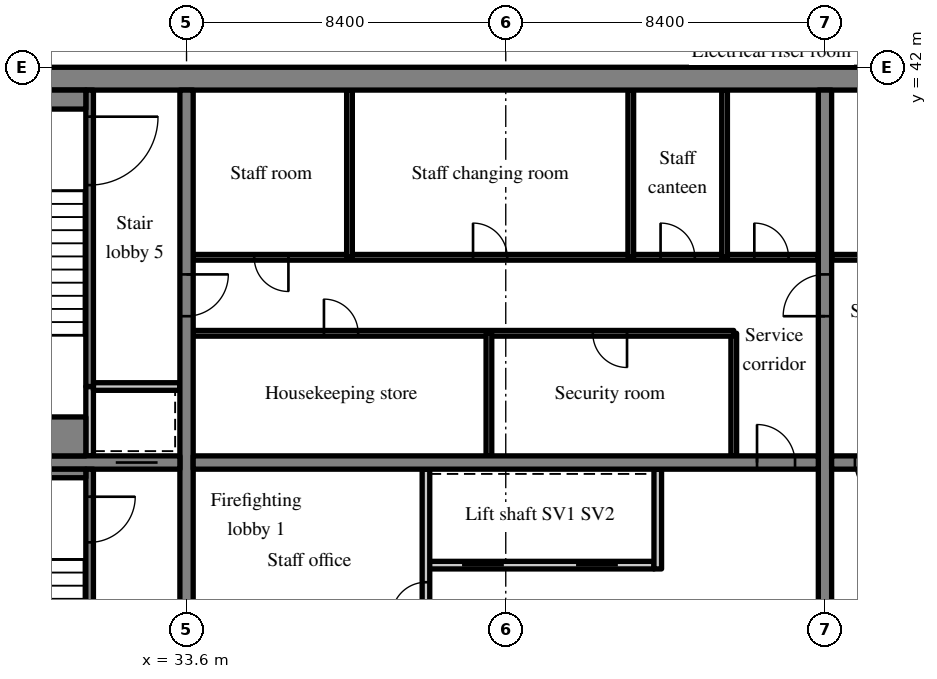
"""IFC4 building model, lengths in metres.
Left out: names, types, materials, properties, quantities, classifications, styles, units other than length and angle.
Written with IfcOpenShell. Run it as: python <this file> out.ifc"""

import sys

from ifc_helpers import new_model, si_unit, direction, frame, frame_2d, origin, place, context, subcontext, project, spatial, rectangle, extrude, source, transform, mapped, element, fill, save


model = new_model("IFC4")
c1 = context("Model", 3, precision=1e-05, world=origin(), true_north=direction((0.0, 1.0)))
c2 = subcontext(c1, "Body", "Model", "MODEL_VIEW")
j1 = project(units=[si_unit("LENGTHUNIT", "METRE"), si_unit("PLANEANGLEUNIT", "RADIAN")], contexts=[c1])
p1 = place(None, origin())
s1 = spatial("IfcSite", under=j1, at=p1, CompositionType="ELEMENT")
p2 = place(p1, origin())
s2 = spatial("IfcBuilding", under=s1, at=p2, CompositionType="ELEMENT")
p3 = place(p2, frame((0.0, 0.0, 225.7)))
s3 = spatial("IfcBuildingStorey", under=s2, at=p3, CompositionType="ELEMENT", Elevation=225.7)
m1 = source(origin(), c2, "Body", "SweptSolid", [
    extrude(rectangle(XDim=50.4, YDim=0.6, at=frame_2d((25.2, 0.0))), origin(), (0.0, 0.0, 1.0), 3.62),
])
p4 = place(p3, frame((25.2, 41.7, 0.0), z_axis=(0.0, 0.0, 1.0), x_axis=(1.0, 0.0, 0.0)))
e1 = element("IfcWall", 1, at=p4, inside=s3, PredefinedType="SHEAR", context=c2, shape_type="MappedRepresentation", body=[
    mapped(m1, transform((0.0, 0.0, 0.0), scale=1.0)),
])
m2 = source(origin(), c2, "Body", "SweptSolid", [
    extrude(rectangle(XDim=18.8, YDim=0.35, at=frame_2d((9.4, 0.0))), origin(), (0.0, 0.0, 1.0), 3.62),
])
p5 = place(p3, frame((33.6, 22.6, 0.0), z_axis=(0.0, 0.0, 1.0), x_axis=(0.0, 1.0, 0.0)))
e2 = element("IfcWall", 2, at=p5, inside=s3, PredefinedType="SHEAR", context=c2, shape_type="MappedRepresentation", body=[
    mapped(m2, transform((0.0, 0.0, 0.0), scale=1.0)),
])
m3 = source(origin(), c2, "Body", "SweptSolid", [
    extrude(rectangle(XDim=1.1, YDim=2.1, at=frame_2d((0.55, 1.05))), frame((0.0, 0.185, 0.0), z_axis=(0.0, -1.0, 0.0), x_axis=(1.0, 0.0, 0.0)), (0.0, 0.0, 1.0), 0.37),
])
p6 = place(p5, frame((12.85, 0.0, 0.0)))
e3 = element("IfcOpeningElement", 3, at=p6, cuts=e2, PredefinedType="OPENING", context=c2, shape_type="MappedRepresentation", body=[
    mapped(m3, transform((0.0, 0.0, 0.0), scale=1.0)),
])
p7 = place(p3, frame((50.4, 22.6, 0.0), z_axis=(0.0, 0.0, 1.0), x_axis=(0.0, 1.0, 0.0)))
e4 = element("IfcWall", 4, at=p7, inside=s3, PredefinedType="SHEAR", context=c2, shape_type="MappedRepresentation", body=[
    mapped(m2, transform((0.0, 0.0, 0.0), scale=1.0)),
])
p8 = place(p7, frame((12.85, 0.0, 0.0)))
e5 = element("IfcOpeningElement", 5, at=p8, cuts=e4, PredefinedType="OPENING", context=c2, shape_type="MappedRepresentation", body=[
    mapped(m3, transform((0.0, 0.0, 0.0), scale=1.0)),
])
m4 = source(origin(), c2, "Body", "SweptSolid", [
    extrude(rectangle(XDim=7.625, YDim=0.35, at=frame_2d((3.812, 0.0))), origin(), (0.0, 0.0, 1.0), 3.62),
])
p9 = place(p3, frame((25.8, 31.6, 0.0), z_axis=(0.0, 0.0, 1.0), x_axis=(1.0, 0.0, 0.0)))
e6 = element("IfcWall", 6, at=p9, inside=s3, PredefinedType="SHEAR", context=c2, shape_type="MappedRepresentation", body=[
    mapped(m4, transform((0.0, 0.0, 0.0), scale=1.0)),
])
p10 = place(p9, frame((5.938, 0.0, 0.0)))
e7 = element("IfcOpeningElement", 7, at=p10, cuts=e6, PredefinedType="OPENING", context=c2, shape_type="MappedRepresentation", body=[
    mapped(m3, transform((0.0, 0.0, 0.0), scale=1.0)),
])
m5 = source(origin(), c2, "Body", "SweptSolid", [
    extrude(rectangle(XDim=16.45, YDim=0.35, at=frame_2d((8.225, 0.0))), origin(), (0.0, 0.0, 1.0), 3.62),
])
p11 = place(p3, frame((33.775, 31.6, 0.0), z_axis=(0.0, 0.0, 1.0), x_axis=(1.0, 0.0, 0.0)))
e8 = element("IfcWall", 8, at=p11, inside=s3, PredefinedType="SHEAR", context=c2, shape_type="MappedRepresentation", body=[
    mapped(m5, transform((0.0, 0.0, 0.0), scale=1.0)),
])
m6 = source(origin(), c2, "Body", "SweptSolid", [
    extrude(rectangle(XDim=1.0, YDim=2.1, at=frame_2d((0.5, 1.05))), frame((0.0, 0.185, 0.0), z_axis=(0.0, -1.0, 0.0), x_axis=(1.0, 0.0, 0.0)), (0.0, 0.0, 1.0), 0.37),
])
p12 = place(p11, frame((14.837, 0.0, 0.0)))
e9 = element("IfcOpeningElement", 9, at=p12, cuts=e8, PredefinedType="OPENING", context=c2, shape_type="MappedRepresentation", body=[
    mapped(m6, transform((0.0, 0.0, 0.0), scale=1.0)),
])
m7 = source(origin(), c2, "Body", "SweptSolid", [
    extrude(rectangle(XDim=16.45, YDim=0.35, at=frame_2d((8.225, 0.0))), origin(), (0.0, 0.0, 1.0), 3.62),
])
p13 = place(p3, frame((50.575, 31.6, 0.0), z_axis=(0.0, 0.0, 1.0), x_axis=(1.0, 0.0, 0.0)))
e10 = element("IfcWall", 10, at=p13, inside=s3, PredefinedType="SHEAR", context=c2, shape_type="MappedRepresentation", body=[
    mapped(m7, transform((0.0, 0.0, 0.0), scale=1.0)),
])
p14 = place(p13, frame((0.613, 0.0, 0.0)))
e11 = element("IfcOpeningElement", 11, at=p14, cuts=e10, PredefinedType="OPENING", context=c2, shape_type="MappedRepresentation", body=[
    mapped(m6, transform((0.0, 0.0, 0.0), scale=1.0)),
])
m8 = source(origin(), c2, "Body", "SweptSolid", [
    extrude(rectangle(XDim=6.0, YDim=0.2, at=frame_2d((3.0, 0.0))), origin(), (0.0, 0.0, 1.0), 3.62),
])
p15 = place(p3, frame((39.9, 28.9, 0.0), z_axis=(0.0, 0.0, 1.0), x_axis=(1.0, 0.0, 0.0)))
e12 = element("IfcWall", 12, at=p15, inside=s3, PredefinedType="SOLIDWALL", context=c2, shape_type="MappedRepresentation", body=[
    mapped(m8, transform((0.0, 0.0, 0.0), scale=1.0)),
])
m9 = source(origin(), c2, "Body", "SweptSolid", [
    extrude(rectangle(XDim=1.1, YDim=2.1, at=frame_2d((0.55, 1.05))), frame((0.0, 0.11, 0.0), z_axis=(0.0, -1.0, 0.0), x_axis=(1.0, 0.0, 0.0)), (0.0, 0.0, 1.0), 0.22),
])
p16 = place(p15, frame((0.95, 0.0, 0.0)))
e13 = element("IfcOpeningElement", 13, at=p16, cuts=e12, PredefinedType="OPENING", context=c2, shape_type="MappedRepresentation", body=[
    mapped(m9, transform((0.0, 0.0, 0.0), scale=1.0)),
])
p17 = place(p15, frame((3.95, 0.0, 0.0)))
e14 = element("IfcOpeningElement", 14, at=p17, cuts=e12, PredefinedType="OPENING", context=c2, shape_type="MappedRepresentation", body=[
    mapped(m9, transform((0.0, 0.0, 0.0), scale=1.0)),
])
m10 = source(origin(), c2, "Body", "SweptSolid", [
    extrude(rectangle(XDim=8.825, YDim=0.2, at=frame_2d((4.413, 0.0))), origin(), (0.0, 0.0, 1.0), 3.62),
])
p18 = place(p3, frame((39.9, 22.6, 0.0), z_axis=(0.0, 0.0, 1.0), x_axis=(0.0, 1.0, 0.0)))
e15 = element("IfcWall", 15, at=p18, inside=s3, PredefinedType="PARTITIONING", context=c2, shape_type="MappedRepresentation", body=[
    mapped(m10, transform((0.0, 0.0, 0.0), scale=1.0)),
])
m11 = source(origin(), c2, "Body", "SweptSolid", [
    extrude(rectangle(XDim=0.9, YDim=2.1, at=frame_2d((0.45, 1.05))), frame((0.0, 0.11, 0.0), z_axis=(0.0, -1.0, 0.0), x_axis=(1.0, 0.0, 0.0)), (0.0, 0.0, 1.0), 0.22),
])
p19 = place(p18, frame((4.95, 0.0, 0.0)))
e16 = element("IfcOpeningElement", 16, at=p19, cuts=e15, PredefinedType="OPENING", context=c2, shape_type="MappedRepresentation", body=[
    mapped(m11, transform((0.0, 0.0, 0.0), scale=1.0)),
])
m12 = source(origin(), c2, "Body", "SweptSolid", [
    extrude(rectangle(XDim=2.625, YDim=0.2, at=frame_2d((1.312, 0.0))), origin(), (0.0, 0.0, 1.0), 3.62),
])
p20 = place(p3, frame((46.0, 28.8, 0.0), z_axis=(0.0, 0.0, 1.0), x_axis=(0.0, 1.0, 0.0)))
e17 = element("IfcWall", 17, at=p20, inside=s3, PredefinedType="SOLIDWALL", context=c2, shape_type="MappedRepresentation", body=[
    mapped(m12, transform((0.0, 0.0, 0.0), scale=1.0)),
])
m13 = source(origin(), c2, "Body", "SweptSolid", [
    extrude(rectangle(XDim=3.225, YDim=0.15, at=frame_2d((1.613, 0.0))), origin(), (0.0, 0.0, 1.0), 3.62),
])
p21 = place(p3, frame((48.0, 31.775, 0.0), z_axis=(0.0, 0.0, 1.0), x_axis=(0.0, 1.0, 0.0)))
e18 = element("IfcWall", 18, at=p21, inside=s3, PredefinedType="PARTITIONING", context=c2, shape_type="MappedRepresentation", body=[
    mapped(m13, transform((0.0, 0.0, 0.0), scale=1.0)),
])
m14 = source(origin(), c2, "Body", "SweptSolid", [
    extrude(rectangle(XDim=14.225, YDim=0.15, at=frame_2d((7.113, 0.0))), origin(), (0.0, 0.0, 1.0), 3.62),
])
p22 = place(p3, frame((33.775, 35.0, 0.0), z_axis=(0.0, 0.0, 1.0), x_axis=(1.0, 0.0, 0.0)))
e19 = element("IfcWall", 19, at=p22, inside=s3, PredefinedType="PARTITIONING", context=c2, shape_type="MappedRepresentation", body=[
    mapped(m14, transform((0.0, 0.0, 0.0), scale=1.0)),
])
m15 = source(origin(), c2, "Body", "SweptSolid", [
    extrude(rectangle(XDim=0.9, YDim=2.1, at=frame_2d((0.45, 1.05))), frame((0.0, 0.085, 0.0), z_axis=(0.0, -1.0, 0.0), x_axis=(1.0, 0.0, 0.0)), (0.0, 0.0, 1.0), 0.17),
])
p23 = place(p22, frame((3.441, 0.0, 0.0)))
e20 = element("IfcOpeningElement", 20, at=p23, cuts=e19, PredefinedType="OPENING", context=c2, shape_type="MappedRepresentation", body=[
    mapped(m15, transform((0.0, 0.0, 0.0), scale=1.0)),
])
p24 = place(p22, frame((10.516, 0.0, 0.0)))
e21 = element("IfcOpeningElement", 21, at=p24, cuts=e19, PredefinedType="OPENING", context=c2, shape_type="MappedRepresentation", body=[
    mapped(m15, transform((0.0, 0.0, 0.0), scale=1.0)),
])
m16 = source(origin(), c2, "Body", "SweptSolid", [
    extrude(rectangle(XDim=16.45, YDim=0.15, at=frame_2d((8.225, 0.0))), origin(), (0.0, 0.0, 1.0), 3.62),
])
p25 = place(p3, frame((33.775, 37.0, 0.0), z_axis=(0.0, 0.0, 1.0), x_axis=(1.0, 0.0, 0.0)))
e22 = element("IfcWall", 22, at=p25, inside=s3, PredefinedType="PARTITIONING", context=c2, shape_type="MappedRepresentation", body=[
    mapped(m16, transform((0.0, 0.0, 0.0), scale=1.0)),
])
p26 = place(p25, frame((1.606, 0.0, 0.0)))
e23 = element("IfcOpeningElement", 23, at=p26, cuts=e22, PredefinedType="OPENING", context=c2, shape_type="MappedRepresentation", body=[
    mapped(m15, transform((0.0, 0.0, 0.0), scale=1.0)),
])
p27 = place(p25, frame((7.364, 0.0, 0.0)))
e24 = element("IfcOpeningElement", 24, at=p27, cuts=e22, PredefinedType="OPENING", context=c2, shape_type="MappedRepresentation", body=[
    mapped(m15, transform((0.0, 0.0, 0.0), scale=1.0)),
])
p28 = place(p25, frame((12.299, 0.0, 0.0)))
e25 = element("IfcOpeningElement", 25, at=p28, cuts=e22, PredefinedType="OPENING", context=c2, shape_type="MappedRepresentation", body=[
    mapped(m15, transform((0.0, 0.0, 0.0), scale=1.0)),
])
p29 = place(p25, frame((14.766, 0.0, 0.0)))
e26 = element("IfcOpeningElement", 26, at=p29, cuts=e22, PredefinedType="OPENING", context=c2, shape_type="MappedRepresentation", body=[
    mapped(m15, transform((0.0, 0.0, 0.0), scale=1.0)),
])
p30 = place(p3, frame((41.557, 31.775, 0.0), z_axis=(0.0, 0.0, 1.0), x_axis=(0.0, 1.0, 0.0)))
e27 = element("IfcWall", 27, at=p30, inside=s3, PredefinedType="PARTITIONING", context=c2, shape_type="MappedRepresentation", body=[
    mapped(m13, transform((0.0, 0.0, 0.0), scale=1.0)),
])
m17 = source(origin(), c2, "Body", "SweptSolid", [
    extrude(rectangle(XDim=4.4, YDim=0.15, at=frame_2d((2.2, 0.0))), origin(), (0.0, 0.0, 1.0), 3.62),
])
for number, where, z_axis, x_axis in (
    (28, (37.888, 37.0, 0.0), (0.0, 0.0, 1.0), (0.0, 1.0, 0.0)),
    (29, (45.29, 37.0, 0.0), (0.0, 0.0, 1.0), (0.0, 1.0, 0.0)),
    (30, (47.758, 37.0, 0.0), (0.0, 0.0, 1.0), (0.0, 1.0, 0.0)),
):
    element("IfcWall", number, at=place(p3, frame(where, z_axis=z_axis, x_axis=x_axis)), inside=s3, PredefinedType="PARTITIONING", context=c2, shape_type="MappedRepresentation", body=[
        mapped(m17, transform((0.0, 0.0, 0.0), scale=1.0)),
    ])
m18 = source(origin(), c2, "Body", "SweptSolid", [
    extrude(rectangle(XDim=16.45, YDim=0.15, at=frame_2d((8.225, 0.0))), origin(), (0.0, 0.0, 1.0), 3.62),
])
p31 = place(p3, frame((67.025, 37.0, 0.0), z_axis=(0.0, 0.0, 1.0), x_axis=(-1.0, 0.0, 0.0)))
e31 = element("IfcWall", 31, at=p31, inside=s3, PredefinedType="PARTITIONING", context=c2, shape_type="MappedRepresentation", body=[
    mapped(m18, transform((0.0, 0.0, 0.0), scale=1.0)),
])
p32 = place(p31, frame((3.251, 0.0, 0.0)))
e32 = element("IfcOpeningElement", 32, at=p32, cuts=e31, PredefinedType="OPENING", context=c2, shape_type="MappedRepresentation", body=[
    mapped(m15, transform((0.0, 0.0, 0.0), scale=1.0)),
])
p33 = place(p31, frame((8.186, 0.0, 0.0)))
e33 = element("IfcOpeningElement", 33, at=p33, cuts=e31, PredefinedType="OPENING", context=c2, shape_type="MappedRepresentation", body=[
    mapped(m15, transform((0.0, 0.0, 0.0), scale=1.0)),
])
p34 = place(p31, frame((11.476, 0.0, 0.0)))
e34 = element("IfcOpeningElement", 34, at=p34, cuts=e31, PredefinedType="OPENING", context=c2, shape_type="MappedRepresentation", body=[
    mapped(m15, transform((0.0, 0.0, 0.0), scale=1.0)),
])
p35 = place(p31, frame((14.766, 0.0, 0.0)))
e35 = element("IfcOpeningElement", 35, at=p35, cuts=e31, PredefinedType="OPENING", context=c2, shape_type="MappedRepresentation", body=[
    mapped(m15, transform((0.0, 0.0, 0.0), scale=1.0)),
])
m19 = source(origin(), c2, "Body", "SweptSolid", [
    extrude(rectangle(XDim=8.825, YDim=0.2, at=frame_2d((4.413, 0.0))), origin(), (0.0, 0.0, 1.0), 3.62),
])
p36 = place(p3, frame((31.05, 22.6, 0.0), z_axis=(0.0, 0.0, 1.0), x_axis=(0.0, 1.0, 0.0)))
e36 = element("IfcWall", 36, at=p36, inside=s3, PredefinedType="SOLIDWALL", context=c2, shape_type="MappedRepresentation", body=[
    mapped(m19, transform((0.0, 0.0, 0.0), scale=1.0)),
])
m20 = source(origin(), c2, "Body", "SweptSolid", [
    extrude(rectangle(XDim=1.2, YDim=2.1, at=frame_2d((0.6, 1.05))), frame((0.0, 0.11, 0.0), z_axis=(0.0, -1.0, 0.0), x_axis=(1.0, 0.0, 0.0)), (0.0, 0.0, 1.0), 0.22),
])
p37 = place(p36, frame((6.9, 0.0, 0.0)))
e37 = element("IfcOpeningElement", 37, at=p37, cuts=e36, PredefinedType="OPENING", context=c2, shape_type="MappedRepresentation", body=[
    mapped(m20, transform((0.0, 0.0, 0.0), scale=1.0)),
])
m21 = source(origin(), c2, "Body", "SweptSolid", [
    extrude(rectangle(XDim=1.825, YDim=0.2, at=frame_2d((0.913, 0.0))), origin(), (0.0, 0.0, 1.0), 3.62),
])
p38 = place(p3, frame((31.05, 31.775, 0.0), z_axis=(0.0, 0.0, 1.0), x_axis=(0.0, 1.0, 0.0)))
e38 = element("IfcWall", 38, at=p38, inside=s3, PredefinedType="SOLIDWALL", context=c2, shape_type="MappedRepresentation", body=[
    mapped(m21, transform((0.0, 0.0, 0.0), scale=1.0)),
])
m22 = source(origin(), c2, "Body", "SweptSolid", [
    extrude(rectangle(XDim=2.275, YDim=0.2, at=frame_2d((1.138, 0.0))), origin(), (0.0, 0.0, 1.0), 3.62),
])
p39 = place(p3, frame((31.15, 33.6, 0.0), z_axis=(0.0, 0.0, 1.0), x_axis=(1.0, 0.0, 0.0)))
e39 = element("IfcWall", 39, at=p39, inside=s3, PredefinedType="SOLIDWALL", context=c2, shape_type="MappedRepresentation", body=[
    mapped(m22, transform((0.0, 0.0, 0.0), scale=1.0)),
])
m23 = source(origin(), c2, "Body", "SweptSolid", [
    extrude(rectangle(XDim=7.8, YDim=0.2, at=frame_2d((3.9, 0.0))), origin(), (0.0, 0.0, 1.0), 3.62),
])
p40 = place(p3, frame((31.05, 33.6, 0.0), z_axis=(0.0, 0.0, 1.0), x_axis=(0.0, 1.0, 0.0)))
e40 = element("IfcWall", 40, at=p40, inside=s3, PredefinedType="SOLIDWALL", context=c2, shape_type="MappedRepresentation", body=[
    mapped(m23, transform((0.0, 0.0, 0.0), scale=1.0)),
])
m24 = source(origin(), c2, "Body", "SweptSolid", [
    extrude(rectangle(XDim=1.8, YDim=2.1, at=frame_2d((0.9, 1.05))), frame((0.0, 0.11, 0.0), z_axis=(0.0, -1.0, 0.0), x_axis=(1.0, 0.0, 0.0)), (0.0, 0.0, 1.0), 0.22),
])
p41 = place(p40, frame((5.3, 0.0, 0.0)))
e41 = element("IfcOpeningElement", 41, at=p41, cuts=e40, PredefinedType="OPENING", context=c2, shape_type="MappedRepresentation", body=[
    mapped(m24, transform((0.0, 0.0, 0.0), scale=1.0)),
])
m25 = source(origin(), c2, "Body", "SweptSolid", [
    extrude(rectangle(XDim=5.15, YDim=0.225, at=frame_2d((2.575, 0.0))), origin(), (0.0, 0.0, 1.0), 3.62),
])
p42 = place(p3, frame((25.8, 31.312, 0.0), z_axis=(0.0, 0.0, 1.0), x_axis=(1.0, 0.0, 0.0)))
e42 = element("IfcWall", 42, at=p42, inside=s3, PredefinedType="SOLIDWALL", context=c2, shape_type="MappedRepresentation", body=[
    mapped(m25, transform((0.0, 0.0, 0.0), scale=1.0)),
])
m26 = source(origin(), c2, "Body", "SweptSolid", [
    extrude(rectangle(XDim=5.15, YDim=0.5, at=frame_2d((2.575, 0.0))), origin(), (0.0, 0.0, 1.0), 3.62),
])
p43 = place(p3, frame((25.8, 41.15, 0.0), z_axis=(0.0, 0.0, 1.0), x_axis=(1.0, 0.0, 0.0)))
e43 = element("IfcWall", 43, at=p43, inside=s3, PredefinedType="SOLIDWALL", context=c2, shape_type="MappedRepresentation", body=[
    mapped(m26, transform((0.0, 0.0, 0.0), scale=1.0)),
])
m27 = source(origin(), c2, "Body", "SweptSolid", [
    extrude(rectangle(XDim=5.15, YDim=1.025, at=frame_2d((2.575, 0.0))), origin(), (0.0, 0.0, 1.0), 3.62),
])
p44 = place(p3, frame((25.8, 32.287, 0.0), z_axis=(0.0, 0.0, 1.0), x_axis=(1.0, 0.0, 0.0)))
e44 = element("IfcWall", 44, at=p44, inside=s3, PredefinedType="SOLIDWALL", context=c2, shape_type="MappedRepresentation", body=[
    mapped(m27, transform((0.0, 0.0, 0.0), scale=1.0)),
])
m28 = source(origin(), c2, "Body", "SweptSolid", [
    extrude(rectangle(XDim=1.0, YDim=2.1, at=frame_2d((0.5, 1.05))), frame((0.0, 0.025, 0.0), z_axis=(0.0, -1.0, 0.0), x_axis=(1.0, 0.0, 0.0)), (0.0, 0.0, 1.0), 0.05),
])
p45 = place(p12, origin())
e45 = element("IfcDoor", 45, at=p45, inside=s3, OperationType="SINGLE_SWING_LEFT", PredefinedType="DOOR", context=c2, shape_type="MappedRepresentation", body=[
    mapped(m28, transform((0.0, 0.0, 0.0), scale=1.0)),
])
fill(e9, e45)
m29 = source(origin(), c2, "Body", "SweptSolid", [
    extrude(rectangle(XDim=1.1, YDim=2.1, at=frame_2d((0.55, 1.05))), frame((0.0, 0.025, 0.0), z_axis=(0.0, -1.0, 0.0), x_axis=(1.0, 0.0, 0.0)), (0.0, 0.0, 1.0), 0.05),
])
p46 = place(p16, origin())
e46 = element("IfcDoor", 46, at=p46, inside=s3, OperationType="SLIDING_TO_LEFT", PredefinedType="DOOR", context=c2, shape_type="MappedRepresentation", body=[
    mapped(m29, transform((0.0, 0.0, 0.0), scale=1.0)),
])
fill(e13, e46)
p47 = place(p17, origin())
e47 = element("IfcDoor", 47, at=p47, inside=s3, OperationType="SLIDING_TO_RIGHT", PredefinedType="DOOR", context=c2, shape_type="MappedRepresentation", body=[
    mapped(m29, transform((0.0, 0.0, 0.0), scale=1.0)),
])
fill(e14, e47)
m30 = source(origin(), c2, "Body", "SweptSolid", [
    extrude(rectangle(XDim=0.9, YDim=2.1, at=frame_2d((0.45, 1.05))), frame((0.0, 0.025, 0.0), z_axis=(0.0, -1.0, 0.0), x_axis=(1.0, 0.0, 0.0)), (0.0, 0.0, 1.0), 0.05),
])
p48 = place(p19, origin())
e48 = element("IfcDoor", 48, at=p48, inside=s3, OperationType="SINGLE_SWING_LEFT", PredefinedType="DOOR", context=c2, shape_type="MappedRepresentation", body=[
    mapped(m30, transform((0.0, 0.0, 0.0), scale=1.0)),
])
fill(e16, e48)
p49 = place(p23, origin())
e49 = element("IfcDoor", 49, at=p49, inside=s3, OperationType="SINGLE_SWING_LEFT", PredefinedType="DOOR", context=c2, shape_type="MappedRepresentation", body=[
    mapped(m30, transform((0.0, 0.0, 0.0), scale=1.0)),
])
fill(e20, e49)
p50 = place(p24, origin())
e50 = element("IfcDoor", 50, at=p50, inside=s3, OperationType="SINGLE_SWING_RIGHT", PredefinedType="DOOR", context=c2, shape_type="MappedRepresentation", body=[
    mapped(m30, transform((0.0, 0.0, 0.0), scale=1.0)),
])
fill(e21, e50)
p51 = place(p26, origin())
e51 = element("IfcDoor", 51, at=p51, inside=s3, OperationType="SINGLE_SWING_RIGHT", PredefinedType="DOOR", context=c2, shape_type="MappedRepresentation", body=[
    mapped(m30, transform((0.0, 0.0, 0.0), scale=1.0)),
])
fill(e23, e51)
p52 = place(p27, origin())
e52 = element("IfcDoor", 52, at=p52, inside=s3, OperationType="SINGLE_SWING_LEFT", PredefinedType="DOOR", context=c2, shape_type="MappedRepresentation", body=[
    mapped(m30, transform((0.0, 0.0, 0.0), scale=1.0)),
])
fill(e24, e52)
p53 = place(p28, origin())
e53 = element("IfcDoor", 53, at=p53, inside=s3, OperationType="SINGLE_SWING_LEFT", PredefinedType="DOOR", context=c2, shape_type="MappedRepresentation", body=[
    mapped(m30, transform((0.0, 0.0, 0.0), scale=1.0)),
])
fill(e25, e53)
p54 = place(p29, origin())
e54 = element("IfcDoor", 54, at=p54, inside=s3, OperationType="SINGLE_SWING_LEFT", PredefinedType="DOOR", context=c2, shape_type="MappedRepresentation", body=[
    mapped(m30, transform((0.0, 0.0, 0.0), scale=1.0)),
])
fill(e26, e54)
p55 = place(p14, origin())
e55 = element("IfcDoor", 55, at=p55, inside=s3, OperationType="SINGLE_SWING_RIGHT", PredefinedType="DOOR", context=c2, shape_type="MappedRepresentation", body=[
    mapped(m28, transform((0.0, 0.0, 0.0), scale=1.0)),
])
fill(e11, e55)
m31 = source(origin(), c2, "Body", "SweptSolid", [
    extrude(rectangle(XDim=1.2, YDim=2.1, at=frame_2d((0.6, 1.05))), frame((0.0, 0.025, 0.0), z_axis=(0.0, -1.0, 0.0), x_axis=(1.0, 0.0, 0.0)), (0.0, 0.0, 1.0), 0.05),
])
p56 = place(p37, origin())
e56 = element("IfcDoor", 56, at=p56, inside=s3, OperationType="SINGLE_SWING_RIGHT", PredefinedType="DOOR", context=c2, shape_type="MappedRepresentation", body=[
    mapped(m31, transform((0.0, 0.0, 0.0), scale=1.0)),
])
fill(e37, e56)
p57 = place(p10, origin())
e57 = element("IfcDoor", 57, at=p57, inside=s3, OperationType="SLIDING_TO_LEFT", PredefinedType="DOOR", context=c2, shape_type="MappedRepresentation", body=[
    mapped(m29, transform((0.0, 0.0, 0.0), scale=1.0)),
])
fill(e7, e57)
m32 = source(origin(), c2, "Body", "SweptSolid", [
    extrude(rectangle(XDim=1.8, YDim=2.1, at=frame_2d((0.9, 1.05))), frame((0.0, 0.025, 0.0), z_axis=(0.0, -1.0, 0.0), x_axis=(1.0, 0.0, 0.0)), (0.0, 0.0, 1.0), 0.05),
])
p58 = place(p41, origin())
e58 = element("IfcDoor", 58, at=p58, inside=s3, OperationType="SINGLE_SWING_RIGHT", PredefinedType="DOOR", context=c2, shape_type="MappedRepresentation", body=[
    mapped(m32, transform((0.0, 0.0, 0.0), scale=1.0)),
])
fill(e41, e58)
p59 = place(p6, origin())
e59 = element("IfcDoor", 59, at=p59, inside=s3, OperationType="SINGLE_SWING_RIGHT", PredefinedType="DOOR", context=c2, shape_type="MappedRepresentation", body=[
    mapped(m29, transform((0.0, 0.0, 0.0), scale=1.0)),
])
fill(e3, e59)
p60 = place(p8, origin())
e60 = element("IfcDoor", 60, at=p60, inside=s3, OperationType="SINGLE_SWING_LEFT", PredefinedType="DOOR", context=c2, shape_type="MappedRepresentation", body=[
    mapped(m29, transform((0.0, 0.0, 0.0), scale=1.0)),
])
fill(e5, e60)
save(model, sys.argv[1])
